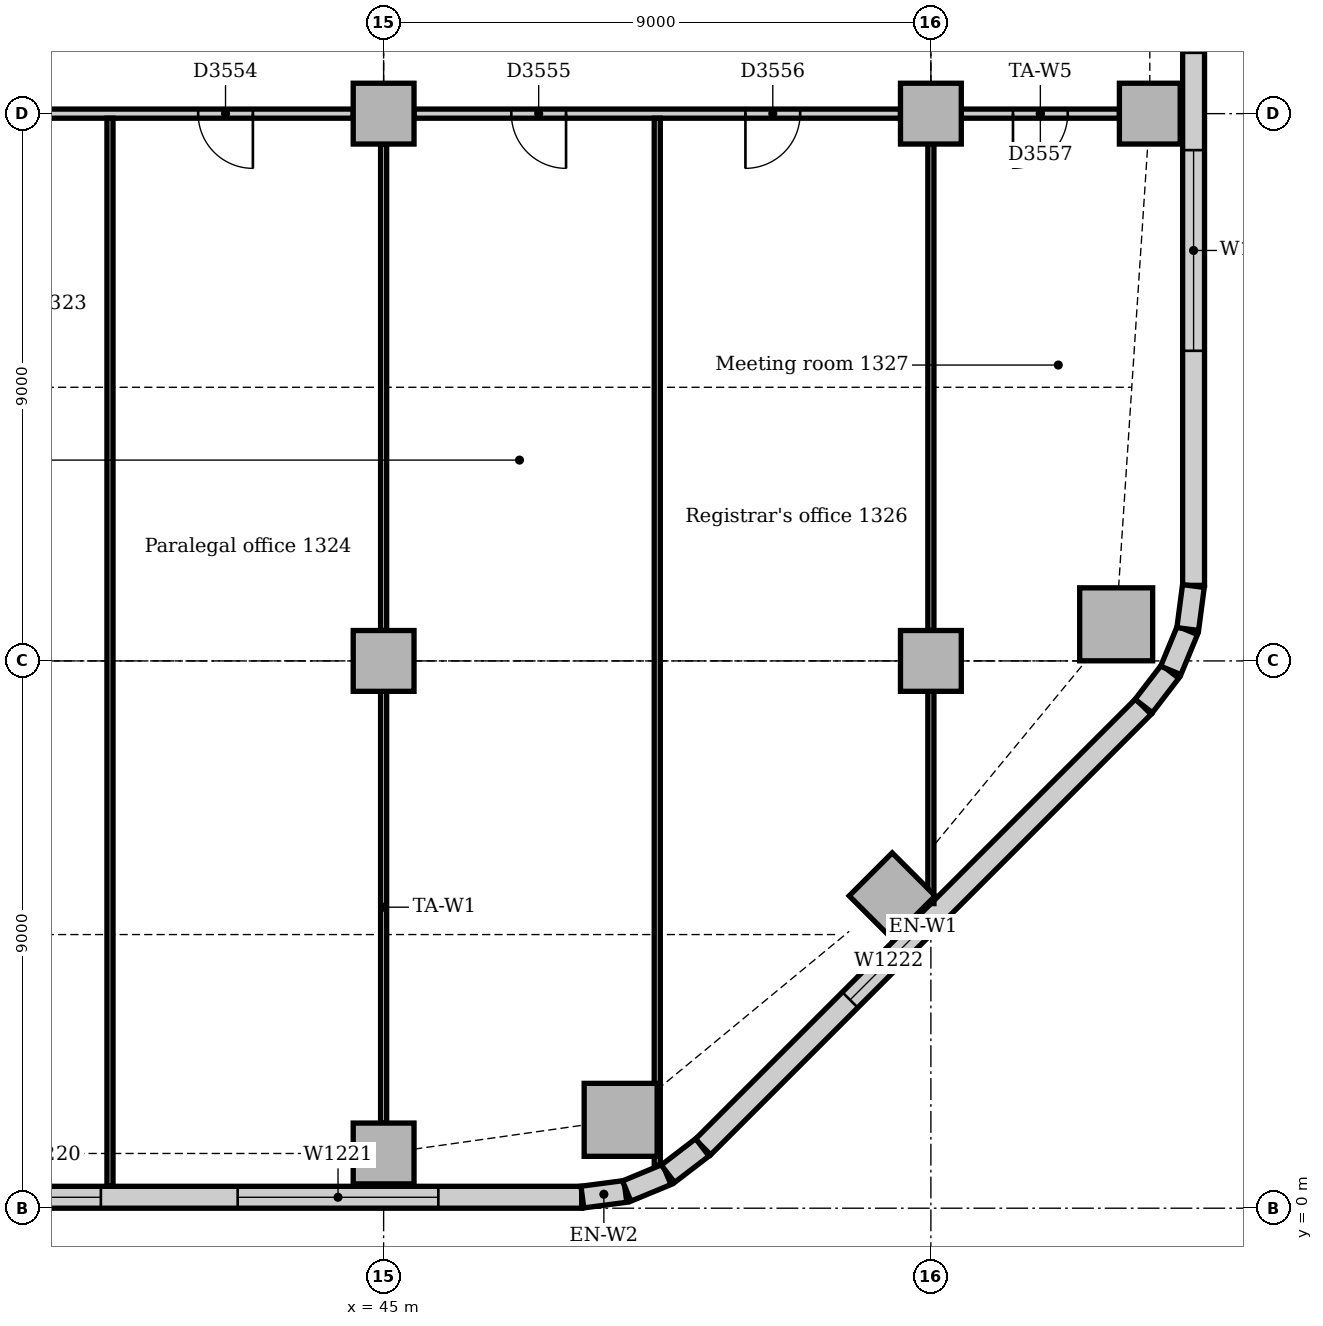
"""IFC4 building model, lengths in metres.
Left out: names, types, materials, properties, quantities, classifications, styles, units other than length and angle.
Written with IfcOpenShell. Run it as: python <this file> out.ifc"""

import sys

from ifc_helpers import new_model, si_unit, direction, frame, frame_2d, origin, origin_2d, place, context, subcontext, project, spatial, rectangle, extrude, element, fill, save


model = new_model("IFC4")
c1 = context("Model", 3, precision=1e-05, world=origin(), true_north=direction((0.0, 1.0)))
c2 = subcontext(c1, "Body", "Model", "MODEL_VIEW")
j1 = project(units=[si_unit("LENGTHUNIT", "METRE"), si_unit("PLANEANGLEUNIT", "RADIAN")], contexts=[c1])
p1 = place(None, origin())
s1 = spatial("IfcSite", under=j1, at=p1, CompositionType="ELEMENT")
p2 = place(p1, origin())
s2 = spatial("IfcBuilding", under=s1, at=p2, CompositionType="ELEMENT")
p3 = place(p2, frame((0.0, 0.0, 59.0)))
s3 = spatial("IfcBuildingStorey", under=s2, at=p3, CompositionType="ELEMENT", Elevation=59.0)
for number, where, z_axis, x_axis in (
    (1, (48.898, 1.453, 0.0), (0.0, 0.0, 1.0), (1.0, 0.0, 0.0)),
    (2, (57.047, 9.602, 0.0), (0.0, 0.0, 1.0), (1.0, 0.0, 0.0)),
):
    element("IfcColumn", number, at=place(p3, frame(where, z_axis=z_axis, x_axis=x_axis)), inside=s3, PredefinedType="COLUMN", context=c2, shape_type="SweptSolid", body=[
        extrude(rectangle(XDim=1.2, YDim=1.2, at=origin_2d()), origin(), (0.0, 0.0, 1.0), 3.85),
    ])
for number, where, z_axis, x_axis in (
    (3, (45.0, 0.9, 0.0), (0.0, 0.0, 1.0), (1.0, 0.0, 0.0)),
    (4, (53.364, 5.136, 0.0), (0.0, 0.0, 1.0), (0.707, 0.707, 0.0)),
    (5, (57.6, 18.0, 0.0), (0.0, 0.0, 1.0), (1.0, 0.0, 0.0)),
    (6, (45.0, 9.0, 0.0), (0.0, 0.0, 1.0), (1.0, 0.0, 0.0)),
    (7, (45.0, 18.0, 0.0), (0.0, 0.0, 1.0), (1.0, 0.0, 0.0)),
    (8, (54.0, 9.0, 0.0), (0.0, 0.0, 1.0), (1.0, 0.0, 0.0)),
    (9, (54.0, 18.0, 0.0), (0.0, 0.0, 1.0), (1.0, 0.0, 0.0)),
):
    element("IfcColumn", number, at=place(p3, frame(where, z_axis=z_axis, x_axis=x_axis)), inside=s3, PredefinedType="COLUMN", context=c2, shape_type="SweptSolid", body=[
        extrude(rectangle(XDim=1.0, YDim=1.0, at=origin_2d()), origin(), (0.0, 0.0, 1.0), 3.85),
    ])
p4 = place(p3, frame((4.243, 0.18, 0.0), z_axis=(0.0, 0.0, 1.0), x_axis=(1.0, 0.0, 0.0)))
e10 = element("IfcWall", 10, at=p4, inside=s3, PredefinedType="STANDARD", context=c2, shape_type="SweptSolid", body=[
    extrude(rectangle(XDim=44.015, YDim=0.36, at=frame_2d((22.007, 0.0))), origin(), (0.0, 0.0, 1.0), 3.85),
])
p5 = place(p4, frame((2.357, 0.0, 0.9)))
e11 = element("IfcOpeningElement", 11, at=p5, cuts=e10, PredefinedType="OPENING", context=c2, shape_type="SweptSolid", body=[
    extrude(rectangle(XDim=3.3, YDim=1.6, at=frame_2d((1.65, 0.8))), frame((0.0, 0.19, 0.0), z_axis=(0.0, -1.0, 0.0), x_axis=(1.0, 0.0, 0.0)), (0.0, 0.0, 1.0), 0.38),
])
p6 = place(p4, frame((7.307, 0.0, 0.9)))
e12 = element("IfcOpeningElement", 12, at=p6, cuts=e10, PredefinedType="OPENING", context=c2, shape_type="SweptSolid", body=[
    extrude(rectangle(XDim=1.8, YDim=1.6, at=frame_2d((0.9, 0.8))), frame((0.0, 0.19, 0.0), z_axis=(0.0, -1.0, 0.0), x_axis=(1.0, 0.0, 0.0)), (0.0, 0.0, 1.0), 0.38),
])
p7 = place(p4, frame((11.357, 0.0, 0.9)))
e13 = element("IfcOpeningElement", 13, at=p7, cuts=e10, PredefinedType="OPENING", context=c2, shape_type="SweptSolid", body=[
    extrude(rectangle(XDim=3.3, YDim=1.6, at=frame_2d((1.65, 0.8))), frame((0.0, 0.19, 0.0), z_axis=(0.0, -1.0, 0.0), x_axis=(1.0, 0.0, 0.0)), (0.0, 0.0, 1.0), 0.38),
])
p8 = place(p4, frame((15.857, 0.0, 0.9)))
e14 = element("IfcOpeningElement", 14, at=p8, cuts=e10, PredefinedType="OPENING", context=c2, shape_type="SweptSolid", body=[
    extrude(rectangle(XDim=3.3, YDim=1.6, at=frame_2d((1.65, 0.8))), frame((0.0, 0.19, 0.0), z_axis=(0.0, -1.0, 0.0), x_axis=(1.0, 0.0, 0.0)), (0.0, 0.0, 1.0), 0.38),
])
p9 = place(p4, frame((20.357, 0.0, 0.9)))
e15 = element("IfcOpeningElement", 15, at=p9, cuts=e10, PredefinedType="OPENING", context=c2, shape_type="SweptSolid", body=[
    extrude(rectangle(XDim=3.3, YDim=1.6, at=frame_2d((1.65, 0.8))), frame((0.0, 0.19, 0.0), z_axis=(0.0, -1.0, 0.0), x_axis=(1.0, 0.0, 0.0)), (0.0, 0.0, 1.0), 0.38),
])
p10 = place(p4, frame((24.857, 0.0, 0.9)))
e16 = element("IfcOpeningElement", 16, at=p10, cuts=e10, PredefinedType="OPENING", context=c2, shape_type="SweptSolid", body=[
    extrude(rectangle(XDim=3.3, YDim=1.6, at=frame_2d((1.65, 0.8))), frame((0.0, 0.19, 0.0), z_axis=(0.0, -1.0, 0.0), x_axis=(1.0, 0.0, 0.0)), (0.0, 0.0, 1.0), 0.38),
])
p11 = place(p4, frame((29.357, 0.0, 0.9)))
e17 = element("IfcOpeningElement", 17, at=p11, cuts=e10, PredefinedType="OPENING", context=c2, shape_type="SweptSolid", body=[
    extrude(rectangle(XDim=3.3, YDim=1.6, at=frame_2d((1.65, 0.8))), frame((0.0, 0.19, 0.0), z_axis=(0.0, -1.0, 0.0), x_axis=(1.0, 0.0, 0.0)), (0.0, 0.0, 1.0), 0.38),
])
p12 = place(p4, frame((34.307, 0.0, 0.9)))
e18 = element("IfcOpeningElement", 18, at=p12, cuts=e10, PredefinedType="OPENING", context=c2, shape_type="SweptSolid", body=[
    extrude(rectangle(XDim=1.8, YDim=1.6, at=frame_2d((0.9, 0.8))), frame((0.0, 0.19, 0.0), z_axis=(0.0, -1.0, 0.0), x_axis=(1.0, 0.0, 0.0)), (0.0, 0.0, 1.0), 0.38),
])
p13 = place(p4, frame((38.357, 0.0, 0.9)))
e19 = element("IfcOpeningElement", 19, at=p13, cuts=e10, PredefinedType="OPENING", context=c2, shape_type="SweptSolid", body=[
    extrude(rectangle(XDim=3.3, YDim=1.6, at=frame_2d((1.65, 0.8))), frame((0.0, 0.19, 0.0), z_axis=(0.0, -1.0, 0.0), x_axis=(1.0, 0.0, 0.0)), (0.0, 0.0, 1.0), 0.38),
])
p14 = place(p3, frame((50.251, 1.006, 0.0), z_axis=(0.0, 0.0, 1.0), x_axis=(0.707106781187, 0.707106781187, 0.0)))
e20 = element("IfcWall", 20, at=p14, inside=s3, PredefinedType="STANDARD", context=c2, shape_type="SweptSolid", body=[
    extrude(rectangle(XDim=10.243, YDim=0.36, at=frame_2d((5.121, 0.0))), origin(), (0.0, 0.0, 1.0), 3.85),
])
p15 = place(p14, frame((3.421, 0.0, 0.9)))
e21 = element("IfcOpeningElement", 21, at=p15, cuts=e20, PredefinedType="OPENING", context=c2, shape_type="SweptSolid", body=[
    extrude(rectangle(XDim=1.8, YDim=1.6, at=frame_2d((0.9, 0.8))), frame((0.0, 0.19, 0.0), z_axis=(0.0, -1.0, 0.0), x_axis=(1.0, 0.0, 0.0)), (0.0, 0.0, 1.0), 0.38),
])
p16 = place(p3, frame((58.32, 10.243, 0.0), z_axis=(0.0, 0.0, 1.0), x_axis=(0.0, 1.0, 0.0)))
e22 = element("IfcWall", 22, at=p16, inside=s3, PredefinedType="STANDARD", context=c2, shape_type="SweptSolid", body=[
    extrude(rectangle(XDim=24.515, YDim=0.36, at=frame_2d((12.257, 0.0))), origin(), (0.0, 0.0, 1.0), 3.85),
])
p17 = place(p16, frame((3.857, 0.0, 0.9)))
e23 = element("IfcOpeningElement", 23, at=p17, cuts=e22, PredefinedType="OPENING", context=c2, shape_type="SweptSolid", body=[
    extrude(rectangle(XDim=3.3, YDim=1.6, at=frame_2d((1.65, 0.8))), frame((0.0, 0.19, 0.0), z_axis=(0.0, -1.0, 0.0), x_axis=(1.0, 0.0, 0.0)), (0.0, 0.0, 1.0), 0.38),
])
p18 = place(p16, frame((8.757, 0.0, 0.9)))
e24 = element("IfcOpeningElement", 24, at=p18, cuts=e22, PredefinedType="OPENING", context=c2, shape_type="SweptSolid", body=[
    extrude(rectangle(XDim=1.8, YDim=1.6, at=frame_2d((0.9, 0.8))), frame((0.0, 0.19, 0.0), z_axis=(0.0, -1.0, 0.0), x_axis=(1.0, 0.0, 0.0)), (0.0, 0.0, 1.0), 0.38),
])
p19 = place(p16, frame((12.857, 0.0, 0.9)))
e25 = element("IfcOpeningElement", 25, at=p19, cuts=e22, PredefinedType="OPENING", context=c2, shape_type="SweptSolid", body=[
    extrude(rectangle(XDim=3.3, YDim=1.6, at=frame_2d((1.65, 0.8))), frame((0.0, 0.19, 0.0), z_axis=(0.0, -1.0, 0.0), x_axis=(1.0, 0.0, 0.0)), (0.0, 0.0, 1.0), 0.38),
])
p20 = place(p16, frame((17.357, 0.0, 0.9)))
e26 = element("IfcOpeningElement", 26, at=p20, cuts=e22, PredefinedType="OPENING", context=c2, shape_type="SweptSolid", body=[
    extrude(rectangle(XDim=3.3, YDim=1.6, at=frame_2d((1.65, 0.8))), frame((0.0, 0.19, 0.0), z_axis=(0.0, -1.0, 0.0), x_axis=(1.0, 0.0, 0.0)), (0.0, 0.0, 1.0), 0.38),
])
for number, where, z_axis, x_axis in (
    (27, (48.269, 0.183, 0.0), (0.0, 0.0, 1.0), (0.991, 0.131, 0.0)),
    (28, (48.997, 0.282, 0.0), (0.0, 0.0, 1.0), (0.924, 0.383, 0.0)),
):
    element("IfcWall", number, at=place(p3, frame(where, z_axis=z_axis, x_axis=x_axis)), inside=s3, PredefinedType="STANDARD", context=c2, shape_type="SweptSolid", body=[
        extrude(rectangle(XDim=0.713, YDim=0.36, at=frame_2d((0.356, 0.0))), origin(), (0.0, 0.0, 1.0), 3.85),
    ])
for number, where, z_axis, x_axis in (
    (29, (49.675, 0.566, 0.0), (0.0, 0.0, 1.0), (0.793, 0.609, 0.0)),
    (30, (57.5, 8.259, 0.0), (0.0, 0.0, 1.0), (0.609, 0.793, 0.0)),
):
    element("IfcWall", number, at=place(p3, frame(where, z_axis=z_axis, x_axis=x_axis)), inside=s3, PredefinedType="STANDARD", context=c2, shape_type="SweptSolid", body=[
        extrude(rectangle(XDim=0.713, YDim=0.36, at=frame_2d((0.357, 0.0))), origin(), (0.0, 0.0, 1.0), 3.85),
    ])
for number, where, z_axis, x_axis in (
    (31, (57.945, 8.844, 0.0), (0.0, 0.0, 1.0), (0.383, 0.924, 0.0)),
    (32, (58.224, 9.524, 0.0), (0.0, 0.0, 1.0), (0.131, 0.991, 0.0)),
):
    element("IfcWall", number, at=place(p3, frame(where, z_axis=z_axis, x_axis=x_axis)), inside=s3, PredefinedType="STANDARD", context=c2, shape_type="SweptSolid", body=[
        extrude(rectangle(XDim=0.713, YDim=0.36, at=frame_2d((0.356, 0.0))), origin(), (0.0, 0.0, 1.0), 3.85),
    ])
p21 = place(p3, frame((54.5, 18.0, 0.0), z_axis=(0.0, 0.0, 1.0), x_axis=(1.0, 0.0, 0.0)))
e33 = element("IfcWall", 33, at=p21, inside=s3, PredefinedType="PARTITIONING", context=c2, shape_type="SweptSolid", body=[
    extrude(rectangle(XDim=2.6, YDim=0.15, at=frame_2d((1.3, 0.0))), origin(), (0.0, 0.0, 1.0), 3.602),
])
p22 = place(p21, frame((0.85, 0.0, 0.0)))
e34 = element("IfcOpeningElement", 34, at=p22, cuts=e33, PredefinedType="OPENING", context=c2, shape_type="SweptSolid", body=[
    extrude(rectangle(XDim=0.9, YDim=2.1, at=frame_2d((0.45, 1.05))), frame((0.0, 0.085, 0.0), z_axis=(0.0, -1.0, 0.0), x_axis=(1.0, 0.0, 0.0)), (0.0, 0.0, 1.0), 0.17),
])
p23 = place(p3, frame((45.5, 18.0, 0.0), z_axis=(0.0, 0.0, 1.0), x_axis=(1.0, 0.0, 0.0)))
e35 = element("IfcWall", 35, at=p23, inside=s3, PredefinedType="PARTITIONING", context=c2, shape_type="SweptSolid", body=[
    extrude(rectangle(XDim=8.0, YDim=0.15, at=frame_2d((4.0, 0.0))), origin(), (0.0, 0.0, 1.0), 3.15),
])
p24 = place(p23, frame((1.6, 0.0, 0.0)))
e36 = element("IfcOpeningElement", 36, at=p24, cuts=e35, PredefinedType="OPENING", context=c2, shape_type="SweptSolid", body=[
    extrude(rectangle(XDim=0.9, YDim=2.1, at=frame_2d((0.45, 1.05))), frame((0.0, 0.085, 0.0), z_axis=(0.0, -1.0, 0.0), x_axis=(1.0, 0.0, 0.0)), (0.0, 0.0, 1.0), 0.17),
])
p25 = place(p23, frame((5.45, 0.0, 0.0)))
e37 = element("IfcOpeningElement", 37, at=p25, cuts=e35, PredefinedType="OPENING", context=c2, shape_type="SweptSolid", body=[
    extrude(rectangle(XDim=0.9, YDim=2.1, at=frame_2d((0.45, 1.05))), frame((0.0, 0.085, 0.0), z_axis=(0.0, -1.0, 0.0), x_axis=(1.0, 0.0, 0.0)), (0.0, 0.0, 1.0), 0.17),
])
p26 = place(p3, frame((36.5, 18.0, 0.0), z_axis=(0.0, 0.0, 1.0), x_axis=(1.0, 0.0, 0.0)))
e38 = element("IfcWall", 38, at=p26, inside=s3, PredefinedType="PARTITIONING", context=c2, shape_type="SweptSolid", body=[
    extrude(rectangle(XDim=8.0, YDim=0.15, at=frame_2d((4.0, 0.0))), origin(), (0.0, 0.0, 1.0), 3.15),
])
p27 = place(p26, frame((1.6, 0.0, 0.0)))
e39 = element("IfcOpeningElement", 39, at=p27, cuts=e38, PredefinedType="OPENING", context=c2, shape_type="SweptSolid", body=[
    extrude(rectangle(XDim=0.9, YDim=2.1, at=frame_2d((0.45, 1.05))), frame((0.0, 0.085, 0.0), z_axis=(0.0, -1.0, 0.0), x_axis=(1.0, 0.0, 0.0)), (0.0, 0.0, 1.0), 0.17),
])
p28 = place(p26, frame((5.45, 0.0, 0.0)))
e40 = element("IfcOpeningElement", 40, at=p28, cuts=e38, PredefinedType="OPENING", context=c2, shape_type="SweptSolid", body=[
    extrude(rectangle(XDim=0.9, YDim=2.1, at=frame_2d((0.45, 1.05))), frame((0.0, 0.085, 0.0), z_axis=(0.0, -1.0, 0.0), x_axis=(1.0, 0.0, 0.0)), (0.0, 0.0, 1.0), 0.17),
])
p29 = place(p3, frame((40.5, 0.36, 0.0), z_axis=(0.0, 0.0, 1.0), x_axis=(0.0, 1.0, 0.0)))
e41 = element("IfcWall", 41, at=p29, inside=s3, PredefinedType="PARTITIONING", context=c2, shape_type="SweptSolid", body=[
    extrude(rectangle(XDim=17.565, YDim=0.1, at=frame_2d((8.783, 0.0))), origin(), (0.0, 0.0, 1.0), 3.85),
])
p30 = place(p3, frame((45.0, 1.4, 0.0), z_axis=(0.0, 0.0, 1.0), x_axis=(0.0, 1.0, 0.0)))
e42 = element("IfcWall", 42, at=p30, inside=s3, PredefinedType="PARTITIONING", context=c2, shape_type="SweptSolid", body=[
    extrude(rectangle(XDim=7.1, YDim=0.1, at=frame_2d((3.55, 0.0))), origin(), (0.0, 0.0, 1.0), 3.158),
])
p31 = place(p3, frame((45.0, 9.5, 0.0), z_axis=(0.0, 0.0, 1.0), x_axis=(0.0, 1.0, 0.0)))
e43 = element("IfcWall", 43, at=p31, inside=s3, PredefinedType="PARTITIONING", context=c2, shape_type="SweptSolid", body=[
    extrude(rectangle(XDim=8.0, YDim=0.1, at=frame_2d((4.0, 0.0))), origin(), (0.0, 0.0, 1.0), 3.158),
])
p32 = place(p3, frame((49.5, 0.706, 0.0), z_axis=(0.0, 0.0, 1.0), x_axis=(0.0, 1.0, 0.0)))
e44 = element("IfcWall", 44, at=p32, inside=s3, PredefinedType="PARTITIONING", context=c2, shape_type="SweptSolid", body=[
    extrude(rectangle(XDim=17.219, YDim=0.1, at=frame_2d((8.61, 0.0))), origin(), (0.0, 0.0, 1.0), 3.85),
])
p33 = place(p3, frame((54.0, 5.009, 0.0), z_axis=(0.0, 0.0, 1.0), x_axis=(0.0, 1.0, 0.0)))
e45 = element("IfcWall", 45, at=p33, inside=s3, PredefinedType="PARTITIONING", context=c2, shape_type="SweptSolid", body=[
    extrude(rectangle(XDim=3.491, YDim=0.1, at=frame_2d((1.745, 0.0))), origin(), (0.0, 0.0, 1.0), 3.652),
])
p34 = place(p3, frame((54.0, 9.5, 0.0), z_axis=(0.0, 0.0, 1.0), x_axis=(0.0, 1.0, 0.0)))
e46 = element("IfcWall", 46, at=p34, inside=s3, PredefinedType="PARTITIONING", context=c2, shape_type="SweptSolid", body=[
    extrude(rectangle(XDim=8.0, YDim=0.1, at=frame_2d((4.0, 0.0))), origin(), (0.0, 0.0, 1.0), 3.158),
])
p35 = place(p12, origin())
e47 = element("IfcWindow", 47, at=p35, inside=s3, PartitioningType="SINGLE_PANEL", PredefinedType="WINDOW", context=c2, shape_type="SweptSolid", body=[
    extrude(rectangle(XDim=1.8, YDim=1.6, at=frame_2d((0.9, 0.8))), frame((0.0, 0.13, 0.0), z_axis=(0.0, -1.0, 0.0), x_axis=(1.0, 0.0, 0.0)), (0.0, 0.0, 1.0), 0.06),
])
fill(e18, e47)
p36 = place(p13, origin())
e48 = element("IfcWindow", 48, at=p36, inside=s3, PartitioningType="SINGLE_PANEL", PredefinedType="WINDOW", context=c2, shape_type="SweptSolid", body=[
    extrude(rectangle(XDim=3.3, YDim=1.6, at=frame_2d((1.65, 0.8))), frame((0.0, 0.13, 0.0), z_axis=(0.0, -1.0, 0.0), x_axis=(1.0, 0.0, 0.0)), (0.0, 0.0, 1.0), 0.06),
])
fill(e19, e48)
p37 = place(p15, origin())
e49 = element("IfcWindow", 49, at=p37, inside=s3, PartitioningType="SINGLE_PANEL", PredefinedType="WINDOW", context=c2, shape_type="SweptSolid", body=[
    extrude(rectangle(XDim=1.8, YDim=1.6, at=frame_2d((0.9, 0.8))), frame((0.0, 0.13, 0.0), z_axis=(0.0, -1.0, 0.0), x_axis=(1.0, 0.0, 0.0)), (0.0, 0.0, 1.0), 0.06),
])
fill(e21, e49)
p38 = place(p17, origin())
e50 = element("IfcWindow", 50, at=p38, inside=s3, PartitioningType="SINGLE_PANEL", PredefinedType="WINDOW", context=c2, shape_type="SweptSolid", body=[
    extrude(rectangle(XDim=3.3, YDim=1.6, at=frame_2d((1.65, 0.8))), frame((0.0, 0.13, 0.0), z_axis=(0.0, -1.0, 0.0), x_axis=(1.0, 0.0, 0.0)), (0.0, 0.0, 1.0), 0.06),
])
fill(e23, e50)
p39 = place(p28, frame((0.9, 0.0, 0.0), z_axis=(0.0, 0.0, 1.0), x_axis=(-1.0, 0.0, 0.0)))
e51 = element("IfcDoor", 51, at=p39, inside=s3, OperationType="SINGLE_SWING_LEFT", PredefinedType="DOOR", context=c2, shape_type="SweptSolid", body=[
    extrude(rectangle(XDim=0.9, YDim=2.1, at=frame_2d((0.45, 1.05))), frame((0.0, 0.025, 0.0), z_axis=(0.0, -1.0, 0.0), x_axis=(1.0, 0.0, 0.0)), (0.0, 0.0, 1.0), 0.05),
])
fill(e40, e51)
p40 = place(p24, frame((0.9, 0.0, 0.0), z_axis=(0.0, 0.0, 1.0), x_axis=(-1.0, 0.0, 0.0)))
e52 = element("IfcDoor", 52, at=p40, inside=s3, OperationType="SINGLE_SWING_LEFT", PredefinedType="DOOR", context=c2, shape_type="SweptSolid", body=[
    extrude(rectangle(XDim=0.9, YDim=2.1, at=frame_2d((0.45, 1.05))), frame((0.0, 0.025, 0.0), z_axis=(0.0, -1.0, 0.0), x_axis=(1.0, 0.0, 0.0)), (0.0, 0.0, 1.0), 0.05),
])
fill(e36, e52)
p41 = place(p25, frame((0.9, 0.0, 0.0), z_axis=(0.0, 0.0, 1.0), x_axis=(-1.0, 0.0, 0.0)))
e53 = element("IfcDoor", 53, at=p41, inside=s3, OperationType="SINGLE_SWING_RIGHT", PredefinedType="DOOR", context=c2, shape_type="SweptSolid", body=[
    extrude(rectangle(XDim=0.9, YDim=2.1, at=frame_2d((0.45, 1.05))), frame((0.0, 0.025, 0.0), z_axis=(0.0, -1.0, 0.0), x_axis=(1.0, 0.0, 0.0)), (0.0, 0.0, 1.0), 0.05),
])
fill(e37, e53)
p42 = place(p22, frame((0.9, 0.0, 0.0), z_axis=(0.0, 0.0, 1.0), x_axis=(-1.0, 0.0, 0.0)))
e54 = element("IfcDoor", 54, at=p42, inside=s3, OperationType="SINGLE_SWING_RIGHT", PredefinedType="DOOR", context=c2, shape_type="SweptSolid", body=[
    extrude(rectangle(XDim=0.9, YDim=2.1, at=frame_2d((0.45, 1.05))), frame((0.0, 0.025, 0.0), z_axis=(0.0, -1.0, 0.0), x_axis=(1.0, 0.0, 0.0)), (0.0, 0.0, 1.0), 0.05),
])
fill(e34, e54)
save(model, sys.argv[1])
